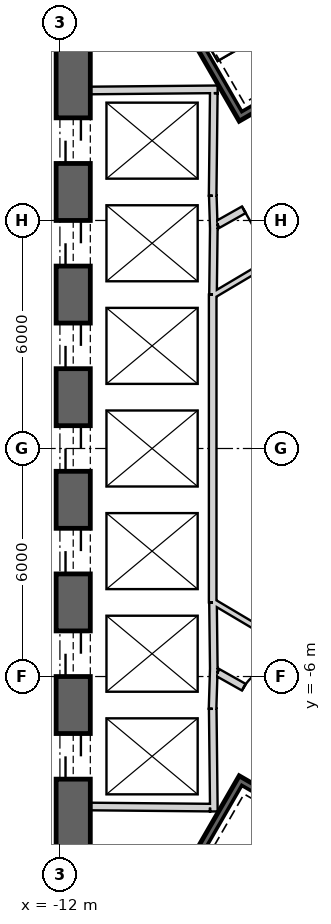
"""IFC4 building model, lengths in metres.
Left out: names, types, materials, properties, quantities, classifications, styles, units other than length and angle.
Written with IfcOpenShell. Run it as: python <this file> out.ifc"""

import sys

from ifc_helpers import new_model, si_unit, direction, frame, frame_2d, origin, place, context, subcontext, project, spatial, rectangle, extrude, element, fill, save


model = new_model("IFC4")
c1 = context("Model", 3, precision=1e-05, world=origin(), true_north=direction((0.0, 1.0)))
c2 = subcontext(c1, "Body", "Model", "MODEL_VIEW")
j1 = project(units=[si_unit("LENGTHUNIT", "METRE"), si_unit("PLANEANGLEUNIT", "RADIAN")], contexts=[c1])
p1 = place(None, origin())
s1 = spatial("IfcSite", under=j1, at=p1, CompositionType="ELEMENT")
p2 = place(p1, origin())
s2 = spatial("IfcBuilding", under=s1, at=p2, CompositionType="ELEMENT")
p3 = place(p2, frame((0.0, 0.0, 156.2)))
s3 = spatial("IfcBuildingStorey", under=s2, at=p3, CompositionType="ELEMENT", Elevation=156.2)
p4 = place(p3, frame((19.475, 2.208, 0.0), z_axis=(0.0, 0.0, 1.0), x_axis=(-0.866028369851, 0.499994862586, 0.0)))
e1 = element("IfcWall", 1, at=p4, inside=s3, PredefinedType="SHEAR", context=c2, shape_type="SweptSolid", body=[
    extrude(rectangle(XDim=31.523, YDim=0.9, at=frame_2d((15.762, 0.0))), origin(), (0.0, 0.0, 1.0), 7.0),
])
p5 = place(p4, frame((7.062, 0.0, 0.0)))
e2 = element("IfcOpeningElement", 2, at=p5, cuts=e1, PredefinedType="OPENING", context=c2, shape_type="SweptSolid", body=[
    extrude(rectangle(XDim=1.2, YDim=2.4, at=frame_2d((0.6, 1.2))), frame((0.0, 0.46, 0.0), z_axis=(0.0, -1.0, 0.0), x_axis=(1.0, 0.0, 0.0)), (0.0, 0.0, 1.0), 0.92),
])
p6 = place(p4, frame((15.162, 0.0, 0.0)))
e3 = element("IfcOpeningElement", 3, at=p6, cuts=e1, PredefinedType="OPENING", context=c2, shape_type="SweptSolid", body=[
    extrude(rectangle(XDim=1.2, YDim=2.4, at=frame_2d((0.6, 1.2))), frame((0.0, 0.46, 0.0), z_axis=(0.0, -1.0, 0.0), x_axis=(1.0, 0.0, 0.0)), (0.0, 0.0, 1.0), 0.92),
])
p7 = place(p4, frame((17.862, 0.0, 0.0)))
e4 = element("IfcOpeningElement", 4, at=p7, cuts=e1, PredefinedType="OPENING", context=c2, shape_type="SweptSolid", body=[
    extrude(rectangle(XDim=1.2, YDim=2.4, at=frame_2d((0.6, 1.2))), frame((0.0, 0.46, 0.0), z_axis=(0.0, -1.0, 0.0), x_axis=(1.0, 0.0, 0.0)), (0.0, 0.0, 1.0), 0.92),
])
p8 = place(p4, frame((20.562, 0.0, 0.0)))
e5 = element("IfcOpeningElement", 5, at=p8, cuts=e1, PredefinedType="OPENING", context=c2, shape_type="SweptSolid", body=[
    extrude(rectangle(XDim=1.2, YDim=2.4, at=frame_2d((0.6, 1.2))), frame((0.0, 0.46, 0.0), z_axis=(0.0, -1.0, 0.0), x_axis=(1.0, 0.0, 0.0)), (0.0, 0.0, 1.0), 0.92),
])
p9 = place(p4, frame((23.262, 0.0, 0.0)))
e6 = element("IfcOpeningElement", 6, at=p9, cuts=e1, PredefinedType="OPENING", context=c2, shape_type="SweptSolid", body=[
    extrude(rectangle(XDim=1.2, YDim=2.4, at=frame_2d((0.6, 1.2))), frame((0.0, 0.46, 0.0), z_axis=(0.0, -1.0, 0.0), x_axis=(1.0, 0.0, 0.0)), (0.0, 0.0, 1.0), 0.92),
])
p10 = place(p4, frame((3.612, 0.0, 0.0)))
e7 = element("IfcOpeningElement", 7, at=p10, cuts=e1, PredefinedType="OPENING", context=c2, shape_type="SweptSolid", body=[
    extrude(rectangle(XDim=1.2, YDim=2.4, at=frame_2d((0.6, 1.2))), frame((0.0, 0.46, 0.0), z_axis=(0.0, -1.0, 0.0), x_axis=(1.0, 0.0, 0.0)), (0.0, 0.0, 1.0), 0.92),
])
p11 = place(p4, frame((26.712, 0.0, 0.0)))
e8 = element("IfcOpeningElement", 8, at=p11, cuts=e1, PredefinedType="OPENING", context=c2, shape_type="SweptSolid", body=[
    extrude(rectangle(XDim=1.2, YDim=2.4, at=frame_2d((0.6, 1.2))), frame((0.0, 0.46, 0.0), z_axis=(0.0, -1.0, 0.0), x_axis=(1.0, 0.0, 0.0)), (0.0, 0.0, 1.0), 0.92),
])
p12 = place(p3, frame((-11.65, 15.762, 0.0), z_axis=(0.0, 0.0, 1.0), x_axis=(0.0, -1.0, 0.0)))
e9 = element("IfcWall", 9, at=p12, inside=s3, PredefinedType="SHEAR", context=c2, shape_type="SweptSolid", body=[
    extrude(rectangle(XDim=31.523, YDim=0.9, at=frame_2d((15.762, 0.0))), origin(), (0.0, 0.0, 1.0), 7.0),
])
p13 = place(p12, frame((7.062, 0.0, 0.0)))
e10 = element("IfcOpeningElement", 10, at=p13, cuts=e9, PredefinedType="OPENING", context=c2, shape_type="SweptSolid", body=[
    extrude(rectangle(XDim=1.2, YDim=2.4, at=frame_2d((0.6, 1.2))), frame((0.0, 0.46, 0.0), z_axis=(0.0, -1.0, 0.0), x_axis=(1.0, 0.0, 0.0)), (0.0, 0.0, 1.0), 0.92),
])
p14 = place(p12, frame((9.762, 0.0, 0.0)))
e11 = element("IfcOpeningElement", 11, at=p14, cuts=e9, PredefinedType="OPENING", context=c2, shape_type="SweptSolid", body=[
    extrude(rectangle(XDim=1.2, YDim=2.4, at=frame_2d((0.6, 1.2))), frame((0.0, 0.46, 0.0), z_axis=(0.0, -1.0, 0.0), x_axis=(1.0, 0.0, 0.0)), (0.0, 0.0, 1.0), 0.92),
])
p15 = place(p12, frame((12.462, 0.0, 0.0)))
e12 = element("IfcOpeningElement", 12, at=p15, cuts=e9, PredefinedType="OPENING", context=c2, shape_type="SweptSolid", body=[
    extrude(rectangle(XDim=1.2, YDim=2.4, at=frame_2d((0.6, 1.2))), frame((0.0, 0.46, 0.0), z_axis=(0.0, -1.0, 0.0), x_axis=(1.0, 0.0, 0.0)), (0.0, 0.0, 1.0), 0.92),
])
p16 = place(p12, frame((15.162, 0.0, 0.0)))
e13 = element("IfcOpeningElement", 13, at=p16, cuts=e9, PredefinedType="OPENING", context=c2, shape_type="SweptSolid", body=[
    extrude(rectangle(XDim=1.2, YDim=2.4, at=frame_2d((0.6, 1.2))), frame((0.0, 0.46, 0.0), z_axis=(0.0, -1.0, 0.0), x_axis=(1.0, 0.0, 0.0)), (0.0, 0.0, 1.0), 0.92),
])
p17 = place(p12, frame((17.862, 0.0, 0.0)))
e14 = element("IfcOpeningElement", 14, at=p17, cuts=e9, PredefinedType="OPENING", context=c2, shape_type="SweptSolid", body=[
    extrude(rectangle(XDim=1.2, YDim=2.4, at=frame_2d((0.6, 1.2))), frame((0.0, 0.46, 0.0), z_axis=(0.0, -1.0, 0.0), x_axis=(1.0, 0.0, 0.0)), (0.0, 0.0, 1.0), 0.92),
])
p18 = place(p12, frame((20.562, 0.0, 0.0)))
e15 = element("IfcOpeningElement", 15, at=p18, cuts=e9, PredefinedType="OPENING", context=c2, shape_type="SweptSolid", body=[
    extrude(rectangle(XDim=1.2, YDim=2.4, at=frame_2d((0.6, 1.2))), frame((0.0, 0.46, 0.0), z_axis=(0.0, -1.0, 0.0), x_axis=(1.0, 0.0, 0.0)), (0.0, 0.0, 1.0), 0.92),
])
p19 = place(p12, frame((23.262, 0.0, 0.0)))
e16 = element("IfcOpeningElement", 16, at=p19, cuts=e9, PredefinedType="OPENING", context=c2, shape_type="SweptSolid", body=[
    extrude(rectangle(XDim=1.2, YDim=2.4, at=frame_2d((0.6, 1.2))), frame((0.0, 0.46, 0.0), z_axis=(0.0, -1.0, 0.0), x_axis=(1.0, 0.0, 0.0)), (0.0, 0.0, 1.0), 0.92),
])
p20 = place(p12, frame((3.612, 0.0, 0.0)))
e17 = element("IfcOpeningElement", 17, at=p20, cuts=e9, PredefinedType="OPENING", context=c2, shape_type="SweptSolid", body=[
    extrude(rectangle(XDim=1.2, YDim=2.4, at=frame_2d((0.6, 1.2))), frame((0.0, 0.46, 0.0), z_axis=(0.0, -1.0, 0.0), x_axis=(1.0, 0.0, 0.0)), (0.0, 0.0, 1.0), 0.92),
])
p21 = place(p12, frame((26.712, 0.0, 0.0)))
e18 = element("IfcOpeningElement", 18, at=p21, cuts=e9, PredefinedType="OPENING", context=c2, shape_type="SweptSolid", body=[
    extrude(rectangle(XDim=1.2, YDim=2.4, at=frame_2d((0.6, 1.2))), frame((0.0, 0.46, 0.0), z_axis=(0.0, -1.0, 0.0), x_axis=(1.0, 0.0, 0.0)), (0.0, 0.0, 1.0), 0.92),
])
p22 = place(p3, frame((-7.825, -17.97, 0.0), z_axis=(0.0, 0.0, 1.0), x_axis=(0.866028369851, 0.499994862586, 0.0)))
e19 = element("IfcWall", 19, at=p22, inside=s3, PredefinedType="SHEAR", context=c2, shape_type="SweptSolid", body=[
    extrude(rectangle(XDim=31.523, YDim=0.9, at=frame_2d((15.762, 0.0))), origin(), (0.0, 0.0, 1.0), 7.0),
])
p23 = place(p22, frame((7.062, 0.0, 0.0)))
e20 = element("IfcOpeningElement", 20, at=p23, cuts=e19, PredefinedType="OPENING", context=c2, shape_type="SweptSolid", body=[
    extrude(rectangle(XDim=1.2, YDim=2.4, at=frame_2d((0.6, 1.2))), frame((0.0, 0.46, 0.0), z_axis=(0.0, -1.0, 0.0), x_axis=(1.0, 0.0, 0.0)), (0.0, 0.0, 1.0), 0.92),
])
p24 = place(p22, frame((9.762, 0.0, 0.0)))
e21 = element("IfcOpeningElement", 21, at=p24, cuts=e19, PredefinedType="OPENING", context=c2, shape_type="SweptSolid", body=[
    extrude(rectangle(XDim=1.2, YDim=2.4, at=frame_2d((0.6, 1.2))), frame((0.0, 0.46, 0.0), z_axis=(0.0, -1.0, 0.0), x_axis=(1.0, 0.0, 0.0)), (0.0, 0.0, 1.0), 0.92),
])
p25 = place(p22, frame((12.462, 0.0, 0.0)))
e22 = element("IfcOpeningElement", 22, at=p25, cuts=e19, PredefinedType="OPENING", context=c2, shape_type="SweptSolid", body=[
    extrude(rectangle(XDim=1.2, YDim=2.4, at=frame_2d((0.6, 1.2))), frame((0.0, 0.46, 0.0), z_axis=(0.0, -1.0, 0.0), x_axis=(1.0, 0.0, 0.0)), (0.0, 0.0, 1.0), 0.92),
])
p26 = place(p22, frame((15.162, 0.0, 0.0)))
e23 = element("IfcOpeningElement", 23, at=p26, cuts=e19, PredefinedType="OPENING", context=c2, shape_type="SweptSolid", body=[
    extrude(rectangle(XDim=1.2, YDim=2.4, at=frame_2d((0.6, 1.2))), frame((0.0, 0.46, 0.0), z_axis=(0.0, -1.0, 0.0), x_axis=(1.0, 0.0, 0.0)), (0.0, 0.0, 1.0), 0.92),
])
p27 = place(p22, frame((17.862, 0.0, 0.0)))
e24 = element("IfcOpeningElement", 24, at=p27, cuts=e19, PredefinedType="OPENING", context=c2, shape_type="SweptSolid", body=[
    extrude(rectangle(XDim=1.2, YDim=2.4, at=frame_2d((0.6, 1.2))), frame((0.0, 0.46, 0.0), z_axis=(0.0, -1.0, 0.0), x_axis=(1.0, 0.0, 0.0)), (0.0, 0.0, 1.0), 0.92),
])
p28 = place(p22, frame((20.562, 0.0, 0.0)))
e25 = element("IfcOpeningElement", 25, at=p28, cuts=e19, PredefinedType="OPENING", context=c2, shape_type="SweptSolid", body=[
    extrude(rectangle(XDim=1.2, YDim=2.4, at=frame_2d((0.6, 1.2))), frame((0.0, 0.46, 0.0), z_axis=(0.0, -1.0, 0.0), x_axis=(1.0, 0.0, 0.0)), (0.0, 0.0, 1.0), 0.92),
])
p29 = place(p22, frame((26.712, 0.0, 0.0)))
e26 = element("IfcOpeningElement", 26, at=p29, cuts=e19, PredefinedType="OPENING", context=c2, shape_type="SweptSolid", body=[
    extrude(rectangle(XDim=1.2, YDim=2.4, at=frame_2d((0.6, 1.2))), frame((0.0, 0.46, 0.0), z_axis=(0.0, -1.0, 0.0), x_axis=(1.0, 0.0, 0.0)), (0.0, 0.0, 1.0), 0.92),
])
p30 = place(p22, frame((3.612, 0.0, 0.0)))
e27 = element("IfcOpeningElement", 27, at=p30, cuts=e19, PredefinedType="OPENING", context=c2, shape_type="SweptSolid", body=[
    extrude(rectangle(XDim=1.2, YDim=2.4, at=frame_2d((0.6, 1.2))), frame((0.0, 0.46, 0.0), z_axis=(0.0, -1.0, 0.0), x_axis=(1.0, 0.0, 0.0)), (0.0, 0.0, 1.0), 0.92),
])
p31 = place(p3, frame((-11.2, 9.42, 0.0), z_axis=(0.0, 0.0, 1.0), x_axis=(0.999957167047, 0.009255488683, 0.0)))
e28 = element("IfcWall", 28, at=p31, inside=s3, PredefinedType="PLUMBINGWALL", context=c2, shape_type="SweptSolid", body=[
    extrude(rectangle(XDim=3.35, YDim=0.2, at=frame_2d((1.675, 0.0))), origin(), (0.0, 0.0, 1.0), 6.65),
])
p32 = place(p3, frame((-7.951, 9.35, 0.0), z_axis=(0.0, 0.0, 1.0), x_axis=(-0.011120469654, -0.999938165666, 0.0)))
e29 = element("IfcWall", 29, at=p32, inside=s3, PredefinedType="PLUMBINGWALL", context=c2, shape_type="SweptSolid", body=[
    extrude(rectangle(XDim=2.7, YDim=0.2, at=frame_2d((1.35, 0.0))), origin(), (0.0, 0.0, 1.0), 6.65),
])
p33 = place(p3, frame((-7.977, 6.65, 0.0), z_axis=(0.0, 0.0, 1.0), x_axis=(0.030861509705, -0.999523670164, 0.0)))
e30 = element("IfcWall", 30, at=p33, inside=s3, PredefinedType="PLUMBINGWALL", context=c2, shape_type="SweptSolid", body=[
    extrude(rectangle(XDim=0.878, YDim=0.2, at=frame_2d((0.439, 0.0))), origin(), (0.0, 0.0, 1.0), 6.65),
])
p34 = place(p3, frame((-7.949, 5.895, 0.0), z_axis=(0.0, 0.0, 1.0), x_axis=(-0.012042535896, -0.999927486035, 0.0)))
e31 = element("IfcWall", 31, at=p34, inside=s3, PredefinedType="PLUMBINGWALL", context=c2, shape_type="SweptSolid", body=[
    extrude(rectangle(XDim=1.845, YDim=0.2, at=frame_2d((0.922, 0.0))), origin(), (0.0, 0.0, 1.0), 6.65),
])
p35 = place(p3, frame((-7.98, 4.05, 0.0), z_axis=(0.0, 0.0, 1.0), x_axis=(0.0, -1.0, 0.0)))
e32 = element("IfcWall", 32, at=p35, inside=s3, PredefinedType="PLUMBINGWALL", context=c2, shape_type="SweptSolid", body=[
    extrude(rectangle(XDim=8.1, YDim=0.2, at=frame_2d((4.05, 0.0))), origin(), (0.0, 0.0, 1.0), 6.65),
])
p36 = place(p3, frame((-7.95, -5.772, 0.0), z_axis=(0.0, 0.0, 1.0), x_axis=(-0.030803413295, -0.999525462272, 0.0)))
e33 = element("IfcWall", 33, at=p36, inside=s3, PredefinedType="PLUMBINGWALL", context=c2, shape_type="SweptSolid", body=[
    extrude(rectangle(XDim=1.078, YDim=0.2, at=frame_2d((0.539, 0.0))), origin(), (0.0, 0.0, 1.0), 6.65),
])
p37 = place(p3, frame((-7.971, -4.05, 0.0), z_axis=(0.0, 0.0, 1.0), x_axis=(0.012042535896, -0.999927486035, 0.0)))
e34 = element("IfcWall", 34, at=p37, inside=s3, PredefinedType="PLUMBINGWALL", context=c2, shape_type="SweptSolid", body=[
    extrude(rectangle(XDim=1.845, YDim=0.2, at=frame_2d((0.922, 0.0))), origin(), (0.0, 0.0, 1.0), 6.65),
])
p38 = place(p3, frame((-7.979, -6.85, 0.0), z_axis=(0.0, 0.0, 1.0), x_axis=(0.011121475088, -0.999938154483, 0.0)))
e35 = element("IfcWall", 35, at=p38, inside=s3, PredefinedType="PLUMBINGWALL", context=c2, shape_type="SweptSolid", body=[
    extrude(rectangle(XDim=2.7, YDim=0.2, at=frame_2d((1.35, 0.0))), origin(), (0.0, 0.0, 1.0), 6.65),
])
p39 = place(p3, frame((-8.05, -9.449, 0.0), z_axis=(0.0, 0.0, 1.0), x_axis=(-0.999957467379, 0.009222983926, 0.0)))
e36 = element("IfcWall", 36, at=p39, inside=s3, PredefinedType="PLUMBINGWALL", context=c2, shape_type="SweptSolid", body=[
    extrude(rectangle(XDim=3.15, YDim=0.2, at=frame_2d((1.575, 0.0))), origin(), (0.0, 0.0, 1.0), 6.65),
])
p40 = place(p3, frame((-11.245, 15.678, -0.35), z_axis=(0.0, 0.0, 1.0), x_axis=(0.499977274689, -0.866038523851, 0.0)))
e37 = element("IfcWall", 37, at=p40, inside=s3, PredefinedType="SHEAR", context=c2, shape_type="SweptSolid", body=[
    extrude(rectangle(XDim=8.1, YDim=0.2, at=frame_2d((4.05, 0.0))), origin(), (0.0, 0.0, 1.0), 7.0),
])
p41 = place(p3, frame((-7.159, 8.8, -0.35), z_axis=(0.0, 0.0, 1.0), x_axis=(0.866047807691, 0.499961193289, 0.0)))
e38 = element("IfcWall", 38, at=p41, inside=s3, PredefinedType="SHEAR", context=c2, shape_type="SweptSolid", body=[
    extrude(rectangle(XDim=3.6, YDim=0.2, at=frame_2d((1.8, 0.0))), origin(), (0.0, 0.0, 1.0), 7.0),
])
p42 = place(p41, frame((1.25, 0.0, 0.35)))
e39 = element("IfcOpeningElement", 39, at=p42, cuts=e38, PredefinedType="OPENING", context=c2, shape_type="SweptSolid", body=[
    extrude(rectangle(XDim=1.1, YDim=2.1, at=frame_2d((0.55, 1.05))), frame((0.0, 0.11, 0.0), z_axis=(0.0, -1.0, 0.0), x_axis=(1.0, 0.0, 0.0)), (0.0, 0.0, 1.0), 0.22),
])
p43 = place(p3, frame((-7.196, -8.663, -0.35), z_axis=(0.0, 0.0, 1.0), x_axis=(-0.499997992926, -0.866026562566, 0.0)))
e40 = element("IfcWall", 40, at=p43, inside=s3, PredefinedType="SHEAR", context=c2, shape_type="SweptSolid", body=[
    extrude(rectangle(XDim=7.9, YDim=0.2, at=frame_2d((3.95, 0.0))), origin(), (0.0, 0.0, 1.0), 7.0),
])
p44 = place(p3, frame((-4.041, -10.599, -0.35), z_axis=(0.0, 0.0, 1.0), x_axis=(-0.866047807691, 0.499961193289, 0.0)))
e41 = element("IfcWall", 41, at=p44, inside=s3, PredefinedType="SHEAR", context=c2, shape_type="SweptSolid", body=[
    extrude(rectangle(XDim=3.6, YDim=0.2, at=frame_2d((1.8, 0.0))), origin(), (0.0, 0.0, 1.0), 7.0),
])
p45 = place(p44, frame((1.25, 0.0, 0.35)))
e42 = element("IfcOpeningElement", 42, at=p45, cuts=e41, PredefinedType="OPENING", context=c2, shape_type="SweptSolid", body=[
    extrude(rectangle(XDim=1.1, YDim=2.1, at=frame_2d((0.55, 1.05))), frame((0.0, 0.11, 0.0), z_axis=(0.0, -1.0, 0.0), x_axis=(1.0, 0.0, 0.0)), (0.0, 0.0, 1.0), 0.22),
])
p46 = place(p3, frame((-5.6, 7.16, 0.0), z_axis=(0.0, 0.0, 1.0), x_axis=(-0.871363259478, -0.490638431059, 0.0)))
e43 = element("IfcWall", 43, at=p46, inside=s3, PredefinedType="PARTITIONING", context=c2, shape_type="SweptSolid", body=[
    extrude(rectangle(XDim=2.581, YDim=0.2, at=frame_2d((1.291, 0.0))), origin(), (0.0, 0.0, 1.0), 6.65),
])
p47 = place(p46, frame((0.791, 0.0, 0.0)))
e44 = element("IfcOpeningElement", 44, at=p47, cuts=e43, PredefinedType="OPENING", context=c2, shape_type="SweptSolid", body=[
    extrude(rectangle(XDim=1.0, YDim=2.1, at=frame_2d((0.5, 1.05))), frame((0.0, 0.11, 0.0), z_axis=(0.0, -1.0, 0.0), x_axis=(1.0, 0.0, 0.0)), (0.0, 0.0, 1.0), 0.22),
])
p48 = place(p3, frame((-7.849, -5.894, 0.0), z_axis=(0.0, 0.0, 1.0), x_axis=(0.871363259478, -0.490638431059, 0.0)))
e45 = element("IfcWall", 45, at=p48, inside=s3, PredefinedType="PARTITIONING", context=c2, shape_type="SweptSolid", body=[
    extrude(rectangle(XDim=2.581, YDim=0.2, at=frame_2d((1.291, 0.0))), origin(), (0.0, 0.0, 1.0), 6.65),
])
p49 = place(p48, frame((0.791, 0.0, 0.0)))
e46 = element("IfcOpeningElement", 46, at=p49, cuts=e45, PredefinedType="OPENING", context=c2, shape_type="SweptSolid", body=[
    extrude(rectangle(XDim=1.0, YDim=2.1, at=frame_2d((0.5, 1.05))), frame((0.0, 0.11, 0.0), z_axis=(0.0, -1.0, 0.0), x_axis=(1.0, 0.0, 0.0)), (0.0, 0.0, 1.0), 0.22),
])
p50 = place(p3, frame((-6.024, 5.183, 0.0), z_axis=(0.0, 0.0, 1.0), x_axis=(-0.860126804455, -0.510080268447, 0.0)))
e47 = element("IfcWall", 47, at=p50, inside=s3, PredefinedType="PLUMBINGWALL", context=c2, shape_type="SweptSolid", body=[
    extrude(rectangle(XDim=2.24, YDim=0.15, at=frame_2d((1.12, 0.0))), origin(), (0.0, 0.0, 1.0), 6.65),
])
p51 = place(p3, frame((-7.95, -4.041, 0.0), z_axis=(0.0, 0.0, 1.0), x_axis=(0.860090281069, -0.510141851263, 0.0)))
e48 = element("IfcWall", 48, at=p51, inside=s3, PredefinedType="PLUMBINGWALL", context=c2, shape_type="SweptSolid", body=[
    extrude(rectangle(XDim=2.089, YDim=0.15, at=frame_2d((1.045, 0.0))), origin(), (0.0, 0.0, 1.0), 6.65),
])
p52 = place(p47, origin())
e49 = element("IfcDoor", 49, at=p52, inside=s3, OperationType="SINGLE_SWING_RIGHT", PredefinedType="USERDEFINED", context=c2, shape_type="SweptSolid", body=[
    extrude(rectangle(XDim=1.0, YDim=2.1, at=frame_2d((0.5, 1.05))), frame((0.0, 0.025, 0.0), z_axis=(0.0, -1.0, 0.0), x_axis=(1.0, 0.0, 0.0)), (0.0, 0.0, 1.0), 0.05),
])
fill(e44, e49)
p53 = place(p49, origin())
e50 = element("IfcDoor", 50, at=p53, inside=s3, OperationType="SINGLE_SWING_RIGHT", PredefinedType="USERDEFINED", context=c2, shape_type="SweptSolid", body=[
    extrude(rectangle(XDim=1.0, YDim=2.1, at=frame_2d((0.5, 1.05))), frame((0.0, 0.025, 0.0), z_axis=(0.0, -1.0, 0.0), x_axis=(1.0, 0.0, 0.0)), (0.0, 0.0, 1.0), 0.05),
])
fill(e46, e50)
p54 = place(p13, origin())
e51 = element("IfcDoor", 51, at=p54, inside=s3, OperationType="SLIDING_TO_LEFT", PredefinedType="USERDEFINED", context=c2, shape_type="SweptSolid", body=[
    extrude(rectangle(XDim=1.2, YDim=2.4, at=frame_2d((0.6, 1.2))), frame((0.0, 0.025, 0.0), z_axis=(0.0, -1.0, 0.0), x_axis=(1.0, 0.0, 0.0)), (0.0, 0.0, 1.0), 0.05),
])
fill(e10, e51)
p55 = place(p14, origin())
e52 = element("IfcDoor", 52, at=p55, inside=s3, OperationType="SLIDING_TO_LEFT", PredefinedType="USERDEFINED", context=c2, shape_type="SweptSolid", body=[
    extrude(rectangle(XDim=1.2, YDim=2.4, at=frame_2d((0.6, 1.2))), frame((0.0, 0.025, 0.0), z_axis=(0.0, -1.0, 0.0), x_axis=(1.0, 0.0, 0.0)), (0.0, 0.0, 1.0), 0.05),
])
fill(e11, e52)
p56 = place(p15, origin())
e53 = element("IfcDoor", 53, at=p56, inside=s3, OperationType="SLIDING_TO_LEFT", PredefinedType="USERDEFINED", context=c2, shape_type="SweptSolid", body=[
    extrude(rectangle(XDim=1.2, YDim=2.4, at=frame_2d((0.6, 1.2))), frame((0.0, 0.025, 0.0), z_axis=(0.0, -1.0, 0.0), x_axis=(1.0, 0.0, 0.0)), (0.0, 0.0, 1.0), 0.05),
])
fill(e12, e53)
p57 = place(p16, origin())
e54 = element("IfcDoor", 54, at=p57, inside=s3, OperationType="SLIDING_TO_LEFT", PredefinedType="USERDEFINED", context=c2, shape_type="SweptSolid", body=[
    extrude(rectangle(XDim=1.2, YDim=2.4, at=frame_2d((0.6, 1.2))), frame((0.0, 0.025, 0.0), z_axis=(0.0, -1.0, 0.0), x_axis=(1.0, 0.0, 0.0)), (0.0, 0.0, 1.0), 0.05),
])
fill(e13, e54)
p58 = place(p17, origin())
e55 = element("IfcDoor", 55, at=p58, inside=s3, OperationType="SLIDING_TO_LEFT", PredefinedType="USERDEFINED", context=c2, shape_type="SweptSolid", body=[
    extrude(rectangle(XDim=1.2, YDim=2.4, at=frame_2d((0.6, 1.2))), frame((0.0, 0.025, 0.0), z_axis=(0.0, -1.0, 0.0), x_axis=(1.0, 0.0, 0.0)), (0.0, 0.0, 1.0), 0.05),
])
fill(e14, e55)
p59 = place(p18, origin())
e56 = element("IfcDoor", 56, at=p59, inside=s3, OperationType="SLIDING_TO_LEFT", PredefinedType="USERDEFINED", context=c2, shape_type="SweptSolid", body=[
    extrude(rectangle(XDim=1.2, YDim=2.4, at=frame_2d((0.6, 1.2))), frame((0.0, 0.025, 0.0), z_axis=(0.0, -1.0, 0.0), x_axis=(1.0, 0.0, 0.0)), (0.0, 0.0, 1.0), 0.05),
])
fill(e15, e56)
p60 = place(p19, origin())
e57 = element("IfcDoor", 57, at=p60, inside=s3, OperationType="SLIDING_TO_LEFT", PredefinedType="USERDEFINED", context=c2, shape_type="SweptSolid", body=[
    extrude(rectangle(XDim=1.2, YDim=2.4, at=frame_2d((0.6, 1.2))), frame((0.0, 0.025, 0.0), z_axis=(0.0, -1.0, 0.0), x_axis=(1.0, 0.0, 0.0)), (0.0, 0.0, 1.0), 0.05),
])
fill(e16, e57)
save(model, sys.argv[1])
